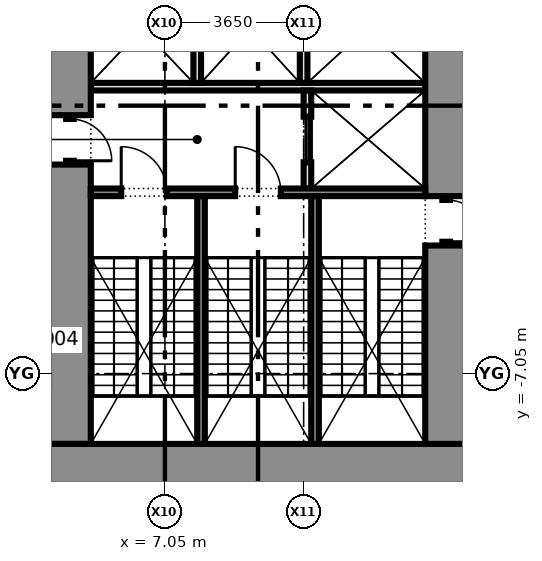
"""IFC4 building model, lengths in metres.
Left out: names, types, materials, properties, quantities, classifications, styles, units other than length and angle.
Written with IfcOpenShell. Run it as: python <this file> out.ifc"""

import sys

from ifc_helpers import new_model, si_unit, direction, frame, frame_2d, origin, place, context, subcontext, project, spatial, rectangle, extrude, element, fill, save


model = new_model("IFC4")
c1 = context("Model", 3, precision=1e-05, world=origin(), true_north=direction((0.0, 1.0)))
c2 = subcontext(c1, "Body", "Model", "MODEL_VIEW")
j1 = project(units=[si_unit("LENGTHUNIT", "METRE"), si_unit("PLANEANGLEUNIT", "RADIAN")], contexts=[c1])
p1 = place(None, origin())
s1 = spatial("IfcSite", under=j1, at=p1, CompositionType="ELEMENT")
p2 = place(p1, origin())
s2 = spatial("IfcBuilding", under=s1, at=p2, CompositionType="ELEMENT")
p3 = place(p2, frame((0.0, 0.0, 11.3)))
s3 = spatial("IfcBuildingStorey", under=s2, at=p3, CompositionType="ELEMENT", Elevation=11.3)
p4 = place(p3, frame((15.0, -9.45, 0.0), z_axis=(0.0, 0.0, 1.0), x_axis=(-1.0, 0.0, 0.0)))
e1 = element("IfcWall", 1, at=p4, inside=s3, PredefinedType="SHEAR", context=c2, shape_type="SweptSolid", body=[
    extrude(rectangle(XDim=11.0, YDim=1.1, at=frame_2d((5.5, 0.0))), origin(), (0.0, 0.0, 1.0), 4.575),
])
p5 = place(p3, frame((14.45, 3.75, 0.0), z_axis=(0.0, 0.0, 1.0), x_axis=(0.0, -1.0, 0.0)))
e2 = element("IfcWall", 2, at=p5, inside=s3, PredefinedType="SHEAR", context=c2, shape_type="SweptSolid", body=[
    extrude(rectangle(XDim=6.13, YDim=1.1, at=frame_2d((3.065, 0.0))), origin(), (0.0, 0.0, 1.0), 4.575),
])
p6 = place(p3, frame((14.45, -2.38, 0.0), z_axis=(0.0, 0.0, 1.0), x_axis=(0.0, -1.0, 0.0)))
e3 = element("IfcWall", 3, at=p6, inside=s3, PredefinedType="SHEAR", context=c2, shape_type="SweptSolid", body=[
    extrude(rectangle(XDim=1.3, YDim=0.2, at=frame_2d((0.65, 0.0))), origin(), (0.0, 0.0, 1.0), 2.4),
])
p7 = place(p6, frame((0.1, 0.0, 0.0)))
e4 = element("IfcOpeningElement", 4, at=p7, cuts=e3, PredefinedType="OPENING", context=c2, shape_type="SweptSolid", body=[
    extrude(rectangle(XDim=1.1, YDim=2.1, at=frame_2d((0.55, 1.05))), frame((0.0, 0.11, 0.0), z_axis=(0.0, -1.0, 0.0), x_axis=(1.0, 0.0, 0.0)), (0.0, 0.0, 1.0), 0.22),
])
p8 = place(p3, frame((14.45, -3.68, 0.0), z_axis=(0.0, 0.0, 1.0), x_axis=(0.0, -1.0, 0.0)))
e5 = element("IfcWall", 5, at=p8, inside=s3, PredefinedType="SHEAR", context=c2, shape_type="SweptSolid", body=[
    extrude(rectangle(XDim=5.22, YDim=1.1, at=frame_2d((2.61, 0.0))), origin(), (0.0, 0.0, 1.0), 4.575),
])
p9 = place(p3, frame((4.55, 3.75, 0.0), z_axis=(0.0, 0.0, 1.0), x_axis=(0.0, -1.0, 0.0)))
e6 = element("IfcWall", 6, at=p9, inside=s3, PredefinedType="SHEAR", context=c2, shape_type="SweptSolid", body=[
    extrude(rectangle(XDim=4.0, YDim=1.1, at=frame_2d((2.0, 0.0))), origin(), (0.0, 0.0, 1.0), 4.575),
])
p10 = place(p3, frame((4.55, -0.25, 0.0), z_axis=(0.0, 0.0, 1.0), x_axis=(0.0, -1.0, 0.0)))
e7 = element("IfcWall", 7, at=p10, inside=s3, PredefinedType="PARTITIONING", context=c2, shape_type="SweptSolid", body=[
    extrude(rectangle(XDim=1.3, YDim=0.2, at=frame_2d((0.65, 0.0))), origin(), (0.0, 0.0, 1.0), 2.4),
])
p11 = place(p10, frame((0.1, 0.0, 0.0)))
e8 = element("IfcOpeningElement", 8, at=p11, cuts=e7, PredefinedType="OPENING", context=c2, shape_type="SweptSolid", body=[
    extrude(rectangle(XDim=1.1, YDim=2.1, at=frame_2d((0.55, 1.05))), frame((0.0, 0.11, 0.0), z_axis=(0.0, -1.0, 0.0), x_axis=(1.0, 0.0, 0.0)), (0.0, 0.0, 1.0), 0.22),
])
p12 = place(p3, frame((4.55, -1.55, 0.0), z_axis=(0.0, 0.0, 1.0), x_axis=(0.0, -1.0, 0.0)))
e9 = element("IfcWall", 9, at=p12, inside=s3, PredefinedType="SHEAR", context=c2, shape_type="SweptSolid", body=[
    extrude(rectangle(XDim=7.35, YDim=1.1, at=frame_2d((3.675, 0.0))), origin(), (0.0, 0.0, 1.0), 4.575),
])
p13 = place(p3, frame((13.9, 0.5, 0.0), z_axis=(0.0, 0.0, 1.0), x_axis=(-1.0, 0.0, 0.0)))
e10 = element("IfcWall", 10, at=p13, inside=s3, PredefinedType="PARTITIONING", context=c2, shape_type="SweptSolid", body=[
    extrude(rectangle(XDim=8.8, YDim=0.2, at=frame_2d((4.4, 0.0))), origin(), (0.0, 0.0, 1.0), 4.575),
])
p14 = place(p3, frame((10.8, 0.4, 0.0), z_axis=(0.0, 0.0, 1.0), x_axis=(0.0, -1.0, 0.0)))
e11 = element("IfcWall", 11, at=p14, inside=s3, PredefinedType="PARTITIONING", context=c2, shape_type="SweptSolid", body=[
    extrude(rectangle(XDim=2.58, YDim=0.2, at=frame_2d((1.29, 0.0))), origin(), (0.0, 0.0, 1.0), 4.575),
])
p15 = place(p14, frame((0.69, 0.0, 0.0)))
e12 = element("IfcOpeningElement", 12, at=p15, cuts=e11, PredefinedType="OPENING", context=c2, shape_type="SweptSolid", body=[
    extrude(rectangle(XDim=1.2, YDim=2.1, at=frame_2d((0.6, 1.05))), frame((0.0, 0.11, 0.0), z_axis=(0.0, -1.0, 0.0), x_axis=(1.0, 0.0, 0.0)), (0.0, 0.0, 1.0), 0.22),
])
p16 = place(p3, frame((13.9, -2.28, 0.0), z_axis=(0.0, 0.0, 1.0), x_axis=(-1.0, 0.0, 0.0)))
e13 = element("IfcWall", 13, at=p16, inside=s3, PredefinedType="SHEAR", context=c2, shape_type="SweptSolid", body=[
    extrude(rectangle(XDim=8.8, YDim=0.2, at=frame_2d((4.4, 0.0))), origin(), (0.0, 0.0, 1.0), 4.575),
])
p17 = place(p16, frame((3.8, 0.0, 0.0)))
e14 = element("IfcOpeningElement", 14, at=p17, cuts=e13, PredefinedType="OPENING", context=c2, shape_type="SweptSolid", body=[
    extrude(rectangle(XDim=1.2, YDim=2.1, at=frame_2d((0.6, 1.05))), frame((0.0, 0.11, 0.0), z_axis=(0.0, -1.0, 0.0), x_axis=(1.0, 0.0, 0.0)), (0.0, 0.0, 1.0), 0.22),
])
p18 = place(p16, frame((6.8, 0.0, 0.0)))
e15 = element("IfcOpeningElement", 15, at=p18, cuts=e13, PredefinedType="OPENING", context=c2, shape_type="SweptSolid", body=[
    extrude(rectangle(XDim=1.2, YDim=2.1, at=frame_2d((0.6, 1.05))), frame((0.0, 0.11, 0.0), z_axis=(0.0, -1.0, 0.0), x_axis=(1.0, 0.0, 0.0)), (0.0, 0.0, 1.0), 0.22),
])
for number, where, z_axis, x_axis in (
    (16, (11.0, -2.38, 0.0), (0.0, 0.0, 1.0), (0.0, -1.0, 0.0)),
    (17, (8.0, -2.38, 0.0), (0.0, 0.0, 1.0), (0.0, -1.0, 0.0)),
):
    element("IfcWall", number, at=place(p3, frame(where, z_axis=z_axis, x_axis=x_axis)), inside=s3, PredefinedType="SHEAR", context=c2, shape_type="SweptSolid", body=[
        extrude(rectangle(XDim=6.52, YDim=0.2, at=frame_2d((3.26, 0.0))), origin(), (0.0, 0.0, 1.0), 4.575),
    ])
for number, where, z_axis, x_axis in (
    (18, (10.7, 3.45, 0.0), (0.0, 0.0, 1.0), (0.0, -1.0, 0.0)),
    (19, (7.9, 3.45, 0.0), (0.0, 0.0, 1.0), (0.0, -1.0, 0.0)),
):
    element("IfcWall", number, at=place(p3, frame(where, z_axis=z_axis, x_axis=x_axis)), inside=s3, PredefinedType="PARTITIONING", context=c2, shape_type="SweptSolid", body=[
        extrude(rectangle(XDim=2.85, YDim=0.2, at=frame_2d((1.425, 0.0))), origin(), (0.0, 0.0, 1.0), 4.575),
    ])
p19 = place(p7, origin())
e20 = element("IfcDoor", 20, at=p19, inside=s3, OperationType="SINGLE_SWING_RIGHT", PredefinedType="DOOR", context=c2, shape_type="SweptSolid", body=[
    extrude(rectangle(XDim=1.1, YDim=2.1, at=frame_2d((0.55, 1.05))), frame((0.0, 0.025, 0.0), z_axis=(0.0, -1.0, 0.0), x_axis=(1.0, 0.0, 0.0)), (0.0, 0.0, 1.0), 0.05),
])
fill(e4, e20)
p20 = place(p11, origin())
e21 = element("IfcDoor", 21, at=p20, inside=s3, OperationType="SINGLE_SWING_RIGHT", PredefinedType="DOOR", context=c2, shape_type="SweptSolid", body=[
    extrude(rectangle(XDim=1.1, YDim=2.1, at=frame_2d((0.55, 1.05))), frame((0.0, 0.025, 0.0), z_axis=(0.0, -1.0, 0.0), x_axis=(1.0, 0.0, 0.0)), (0.0, 0.0, 1.0), 0.05),
])
fill(e8, e21)
p21 = place(p15, origin())
e22 = element("IfcDoor", 22, at=p21, inside=s3, OperationType="DOUBLE_DOOR_SLIDING", PredefinedType="DOOR", context=c2, shape_type="SweptSolid", body=[
    extrude(rectangle(XDim=1.2, YDim=2.1, at=frame_2d((0.6, 1.05))), frame((0.0, 0.025, 0.0), z_axis=(0.0, -1.0, 0.0), x_axis=(1.0, 0.0, 0.0)), (0.0, 0.0, 1.0), 0.05),
])
fill(e12, e22)
p22 = place(p17, frame((1.2, 0.0, 0.0), z_axis=(0.0, 0.0, 1.0), x_axis=(-1.0, 0.0, 0.0)))
e23 = element("IfcDoor", 23, at=p22, inside=s3, OperationType="SINGLE_SWING_LEFT", PredefinedType="DOOR", context=c2, shape_type="SweptSolid", body=[
    extrude(rectangle(XDim=1.2, YDim=2.1, at=frame_2d((0.6, 1.05))), frame((0.0, 0.025, 0.0), z_axis=(0.0, -1.0, 0.0), x_axis=(1.0, 0.0, 0.0)), (0.0, 0.0, 1.0), 0.05),
])
fill(e14, e23)
p23 = place(p18, frame((1.2, 0.0, 0.0), z_axis=(0.0, 0.0, 1.0), x_axis=(-1.0, 0.0, 0.0)))
e24 = element("IfcDoor", 24, at=p23, inside=s3, OperationType="SINGLE_SWING_LEFT", PredefinedType="DOOR", context=c2, shape_type="SweptSolid", body=[
    extrude(rectangle(XDim=1.2, YDim=2.1, at=frame_2d((0.6, 1.05))), frame((0.0, 0.025, 0.0), z_axis=(0.0, -1.0, 0.0), x_axis=(1.0, 0.0, 0.0)), (0.0, 0.0, 1.0), 0.05),
])
fill(e15, e24)
save(model, sys.argv[1])
